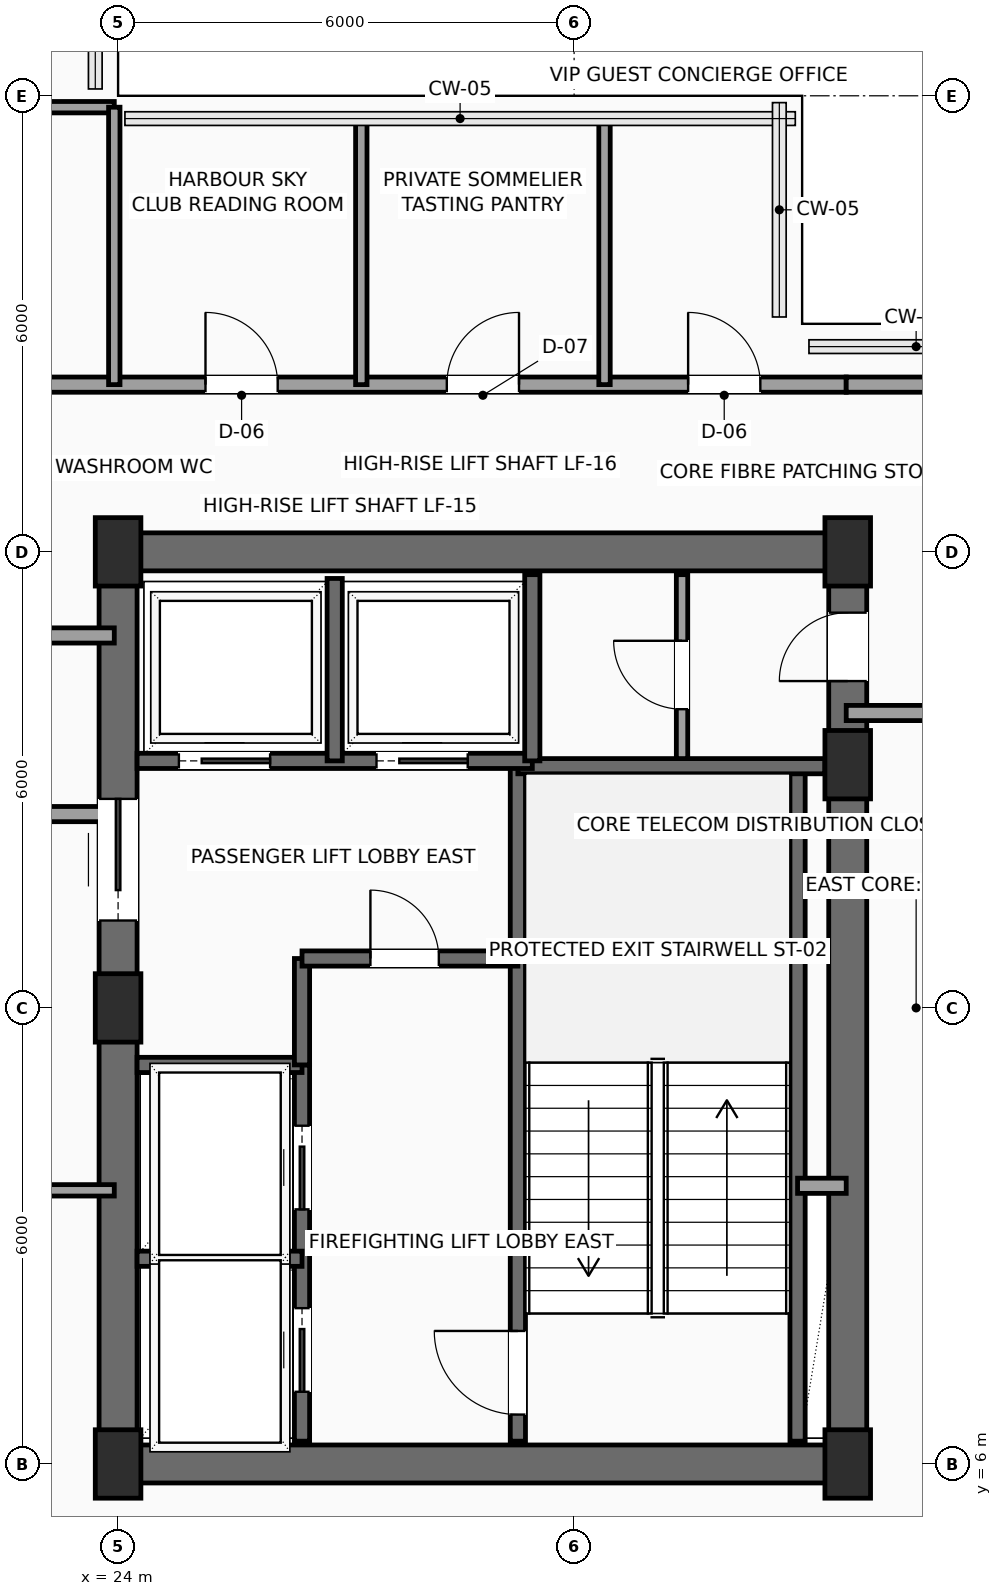
"""IFC4 building model, lengths in metres.
Left out: names, types, materials, properties, quantities, classifications, styles, units other than length and angle.
Written with IfcOpenShell. Run it as: python <this file> out.ifc"""

import sys

from ifc_helpers import new_model, si_unit, direction, frame, frame_2d, origin, origin_2d, place, context, subcontext, project, spatial, rectangle, extrude, element, fill, save


model = new_model("IFC4")
c1 = context("Model", 3, precision=1e-05, world=origin(), true_north=direction((0.0, 1.0)))
c2 = subcontext(c1, "Body", "Model", "MODEL_VIEW")
j1 = project(units=[si_unit("LENGTHUNIT", "METRE"), si_unit("PLANEANGLEUNIT", "RADIAN")], contexts=[c1])
p1 = place(None, origin())
s1 = spatial("IfcSite", under=j1, at=p1, CompositionType="ELEMENT")
p2 = place(p1, origin())
s2 = spatial("IfcBuilding", under=s1, at=p2, CompositionType="ELEMENT")
p3 = place(p2, frame((0.0, 0.0, 274.7)))
s3 = spatial("IfcBuildingStorey", under=s2, at=p3, CompositionType="ELEMENT", Elevation=274.7)
for number, where, z_axis, x_axis in (
    (1, (24.0, 6.0, 0.0), (0.0, 0.0, 1.0), (1.0, 0.0, 0.0)),
    (2, (24.0, 12.0, 0.0), (0.0, 0.0, 1.0), (1.0, 0.0, 0.0)),
    (3, (24.0, 18.0, 0.0), (0.0, 0.0, 1.0), (1.0, 0.0, 0.0)),
    (4, (33.6, 6.0, 0.0), (0.0, 0.0, 1.0), (1.0, 0.0, 0.0)),
    (5, (33.6, 15.2, 0.0), (0.0, 0.0, 1.0), (1.0, 0.0, 0.0)),
    (6, (33.6, 18.0, 0.0), (0.0, 0.0, 1.0), (1.0, 0.0, 0.0)),
):
    element("IfcColumn", number, at=place(p3, frame(where, z_axis=z_axis, x_axis=x_axis)), inside=s3, PredefinedType="COLUMN", context=c2, shape_type="SweptSolid", body=[
        extrude(rectangle(XDim=0.6, YDim=0.9, at=origin_2d()), origin(), (0.0, 0.0, 1.0), 3.5),
    ])
for number, where, z_axis, x_axis in (
    (7, (24.0, 6.0, 0.0), (0.0, 0.0, 1.0), (1.0, 0.0, 0.0)),
    (8, (24.0, 18.0, 0.0), (0.0, 0.0, 1.0), (1.0, 0.0, 0.0)),
):
    element("IfcWall", number, at=place(p3, frame(where, z_axis=z_axis, x_axis=x_axis)), inside=s3, PredefinedType="SHEAR", context=c2, shape_type="SweptSolid", body=[
        extrude(rectangle(XDim=9.6, YDim=0.5, at=frame_2d((4.8, 0.0))), origin(), (0.0, 0.0, 1.0), 3.3),
    ])
p4 = place(p3, frame((24.0, 6.0, 0.0), z_axis=(0.0, 0.0, 1.0), x_axis=(0.0, 1.0, 0.0)))
e9 = element("IfcWall", 9, at=p4, inside=s3, PredefinedType="SHEAR", context=c2, shape_type="SweptSolid", body=[
    extrude(rectangle(XDim=12.0, YDim=0.5, at=frame_2d((6.0, 0.0))), origin(), (0.0, 0.0, 1.0), 3.3),
])
p5 = place(p4, frame((7.15, 0.0, 0.0)))
e10 = element("IfcOpeningElement", 10, at=p5, cuts=e9, PredefinedType="OPENING", context=c2, shape_type="SweptSolid", body=[
    extrude(rectangle(XDim=1.6, YDim=2.3, at=frame_2d((0.8, 1.15))), frame((0.0, 0.26, 0.0), z_axis=(0.0, -1.0, 0.0), x_axis=(1.0, 0.0, 0.0)), (0.0, 0.0, 1.0), 0.52),
])
p6 = place(p3, frame((33.6, 6.0, 0.0), z_axis=(0.0, 0.0, 1.0), x_axis=(0.0, 1.0, 0.0)))
e11 = element("IfcWall", 11, at=p6, inside=s3, PredefinedType="SHEAR", context=c2, shape_type="SweptSolid", body=[
    extrude(rectangle(XDim=12.0, YDim=0.5, at=frame_2d((6.0, 0.0))), origin(), (0.0, 0.0, 1.0), 3.3),
])
p7 = place(p6, frame((10.3, 0.0, 0.0)))
e12 = element("IfcOpeningElement", 12, at=p7, cuts=e11, PredefinedType="OPENING", context=c2, shape_type="SweptSolid", body=[
    extrude(rectangle(XDim=0.9, YDim=2.15, at=frame_2d((0.45, 1.075))), frame((0.0, 0.26, 0.0), z_axis=(0.0, -1.0, 0.0), x_axis=(1.0, 0.0, 0.0)), (0.0, 0.0, 1.0), 0.52),
])
p8 = place(p3, frame((29.26, 6.3, 0.0), z_axis=(0.0, 0.0, 1.0), x_axis=(0.0, 1.0, 0.0)))
e13 = element("IfcWall", 13, at=p8, inside=s3, PredefinedType="SHEAR", context=c2, shape_type="SweptSolid", body=[
    extrude(rectangle(XDim=8.88, YDim=0.2, at=frame_2d((4.44, 0.0))), origin(), (0.0, 0.0, 1.0), 3.3),
])
p9 = place(p8, frame((0.35, 0.0, 0.0)))
e14 = element("IfcOpeningElement", 14, at=p9, cuts=e13, PredefinedType="OPENING", context=c2, shape_type="SweptSolid", body=[
    extrude(rectangle(XDim=1.1, YDim=2.2, at=frame_2d((0.55, 1.1))), frame((0.0, 0.11, 0.0), z_axis=(0.0, -1.0, 0.0), x_axis=(1.0, 0.0, 0.0)), (0.0, 0.0, 1.0), 0.22),
])
p10 = place(p3, frame((32.94, 6.3, 0.0), z_axis=(0.0, 0.0, 1.0), x_axis=(0.0, 1.0, 0.0)))
e15 = element("IfcWall", 15, at=p10, inside=s3, PredefinedType="SHEAR", context=c2, shape_type="SweptSolid", body=[
    extrude(rectangle(XDim=8.88, YDim=0.2, at=frame_2d((4.44, 0.0))), origin(), (0.0, 0.0, 1.0), 3.3),
])
p11 = place(p3, frame((29.26, 15.18, 0.0), z_axis=(0.0, 0.0, 1.0), x_axis=(1.0, 0.0, 0.0)))
e16 = element("IfcWall", 16, at=p11, inside=s3, PredefinedType="SHEAR", context=c2, shape_type="SweptSolid", body=[
    extrude(rectangle(XDim=4.04, YDim=0.2, at=frame_2d((2.02, 0.0))), origin(), (0.0, 0.0, 1.0), 3.3),
])
p12 = place(p3, frame((26.42, 6.3, 0.0), z_axis=(0.0, 0.0, 1.0), x_axis=(0.0, 1.0, 0.0)))
e17 = element("IfcWall", 17, at=p12, inside=s3, PredefinedType="SHEAR", context=c2, shape_type="SweptSolid", body=[
    extrude(rectangle(XDim=4.95, YDim=0.2, at=frame_2d((2.475, 0.0))), origin(), (0.0, 0.0, 1.0), 3.3),
])
p13 = place(p12, frame((0.65, 0.0, 0.0)))
e18 = element("IfcOpeningElement", 18, at=p13, cuts=e17, PredefinedType="OPENING", context=c2, shape_type="SweptSolid", body=[
    extrude(rectangle(XDim=1.1, YDim=2.2, at=frame_2d((0.55, 1.1))), frame((0.0, 0.11, 0.0), z_axis=(0.0, -1.0, 0.0), x_axis=(1.0, 0.0, 0.0)), (0.0, 0.0, 1.0), 0.22),
])
p14 = place(p12, frame((3.05, 0.0, 0.0)))
e19 = element("IfcOpeningElement", 19, at=p14, cuts=e17, PredefinedType="OPENING", context=c2, shape_type="SweptSolid", body=[
    extrude(rectangle(XDim=1.1, YDim=2.2, at=frame_2d((0.55, 1.1))), frame((0.0, 0.11, 0.0), z_axis=(0.0, -1.0, 0.0), x_axis=(1.0, 0.0, 0.0)), (0.0, 0.0, 1.0), 0.22),
])
for number, where, z_axis, x_axis in (
    (20, (24.25, 8.7, 0.0), (0.0, 0.0, 1.0), (1.0, 0.0, 0.0)),
    (21, (24.25, 11.25, 0.0), (0.0, 0.0, 1.0), (1.0, 0.0, 0.0)),
):
    element("IfcWall", number, at=place(p3, frame(where, z_axis=z_axis, x_axis=x_axis)), inside=s3, PredefinedType="SHEAR", context=c2, shape_type="SweptSolid", body=[
        extrude(rectangle(XDim=2.17, YDim=0.2, at=frame_2d((1.085, 0.0))), origin(), (0.0, 0.0, 1.0), 3.3),
    ])
p15 = place(p3, frame((26.42, 11.25, 0.0), z_axis=(0.0, 0.0, 1.0), x_axis=(0.0, 1.0, 0.0)))
e22 = element("IfcWall", 22, at=p15, inside=s3, PredefinedType="SHEAR", context=c2, shape_type="SweptSolid", body=[
    extrude(rectangle(XDim=1.4, YDim=0.2, at=frame_2d((0.7, 0.0))), origin(), (0.0, 0.0, 1.0), 3.3),
])
p16 = place(p3, frame((26.42, 12.65, 0.0), z_axis=(0.0, 0.0, 1.0), x_axis=(1.0, 0.0, 0.0)))
e23 = element("IfcWall", 23, at=p16, inside=s3, PredefinedType="SHEAR", context=c2, shape_type="SweptSolid", body=[
    extrude(rectangle(XDim=2.84, YDim=0.2, at=frame_2d((1.42, 0.0))), origin(), (0.0, 0.0, 1.0), 3.3),
])
p17 = place(p16, frame((0.9, 0.0, 0.0)))
e24 = element("IfcOpeningElement", 24, at=p17, cuts=e23, PredefinedType="OPENING", context=c2, shape_type="SweptSolid", body=[
    extrude(rectangle(XDim=0.9, YDim=2.15, at=frame_2d((0.45, 1.075))), frame((0.0, 0.11, 0.0), z_axis=(0.0, -1.0, 0.0), x_axis=(1.0, 0.0, 0.0)), (0.0, 0.0, 1.0), 0.22),
])
p18 = place(p3, frame((32.94, 9.66, 0.0), z_axis=(0.0, 0.0, 1.0), x_axis=(1.0, 0.0, 0.0)))
e25 = element("IfcWall", 25, at=p18, inside=s3, PredefinedType="SOLIDWALL", context=c2, shape_type="SweptSolid", body=[
    extrude(rectangle(XDim=0.64, YDim=0.2, at=frame_2d((0.32, 0.0))), origin(), (0.0, 0.0, 1.0), 3.3),
])
p19 = place(p3, frame((24.25, 15.25, 0.0), z_axis=(0.0, 0.0, 1.0), x_axis=(1.0, 0.0, 0.0)))
e26 = element("IfcWall", 26, at=p19, inside=s3, PredefinedType="SHEAR", context=c2, shape_type="SweptSolid", body=[
    extrude(rectangle(XDim=5.2, YDim=0.2, at=frame_2d((2.6, 0.0))), origin(), (0.0, 0.0, 1.0), 3.3),
])
p20 = place(p19, frame((0.55, 0.0, 0.0)))
e27 = element("IfcOpeningElement", 27, at=p20, cuts=e26, PredefinedType="OPENING", context=c2, shape_type="SweptSolid", body=[
    extrude(rectangle(XDim=1.2, YDim=2.2, at=frame_2d((0.6, 1.1))), frame((0.0, 0.11, 0.0), z_axis=(0.0, -1.0, 0.0), x_axis=(1.0, 0.0, 0.0)), (0.0, 0.0, 1.0), 0.22),
])
p21 = place(p19, frame((3.15, 0.0, 0.0)))
e28 = element("IfcOpeningElement", 28, at=p21, cuts=e26, PredefinedType="OPENING", context=c2, shape_type="SweptSolid", body=[
    extrude(rectangle(XDim=1.2, YDim=2.2, at=frame_2d((0.6, 1.1))), frame((0.0, 0.11, 0.0), z_axis=(0.0, -1.0, 0.0), x_axis=(1.0, 0.0, 0.0)), (0.0, 0.0, 1.0), 0.22),
])
p22 = place(p3, frame((26.85, 15.25, 0.0), z_axis=(0.0, 0.0, 1.0), x_axis=(0.0, 1.0, 0.0)))
e29 = element("IfcWall", 29, at=p22, inside=s3, PredefinedType="SHEAR", context=c2, shape_type="SweptSolid", body=[
    extrude(rectangle(XDim=2.4, YDim=0.2, at=frame_2d((1.2, 0.0))), origin(), (0.0, 0.0, 1.0), 3.3),
])
p23 = place(p3, frame((29.45, 15.25, 0.0), z_axis=(0.0, 0.0, 1.0), x_axis=(0.0, 1.0, 0.0)))
e30 = element("IfcWall", 30, at=p23, inside=s3, PredefinedType="SHEAR", context=c2, shape_type="SweptSolid", body=[
    extrude(rectangle(XDim=2.45, YDim=0.2, at=frame_2d((1.225, 0.0))), origin(), (0.0, 0.0, 1.0), 3.3),
])
p24 = place(p3, frame((31.42, 15.28, 0.0), z_axis=(0.0, 0.0, 1.0), x_axis=(0.0, 1.0, 0.0)))
e31 = element("IfcWall", 31, at=p24, inside=s3, PredefinedType="PARTITIONING", context=c2, shape_type="SweptSolid", body=[
    extrude(rectangle(XDim=2.42, YDim=0.15, at=frame_2d((1.21, 0.0))), origin(), (0.0, 0.0, 1.0), 3.3),
])
p25 = place(p24, frame((0.65, 0.0, 0.0)))
e32 = element("IfcOpeningElement", 32, at=p25, cuts=e31, PredefinedType="OPENING", context=c2, shape_type="SweptSolid", body=[
    extrude(rectangle(XDim=0.9, YDim=2.15, at=frame_2d((0.45, 1.075))), frame((0.0, 0.085, 0.0), z_axis=(0.0, -1.0, 0.0), x_axis=(1.0, 0.0, 0.0)), (0.0, 0.0, 1.0), 0.17),
])
p26 = place(p3, frame((20.45, 20.2, 0.0), z_axis=(0.0, 0.0, 1.0), x_axis=(1.0, 0.0, 0.0)))
e33 = element("IfcWall", 33, at=p26, inside=s3, PredefinedType="PARTITIONING", context=c2, shape_type="SweptSolid", body=[
    extrude(rectangle(XDim=13.13, YDim=0.2, at=frame_2d((6.565, 0.0))), origin(), (0.0, 0.0, 1.0), 3.3),
])
p27 = place(p26, frame((4.7, 0.0, 0.0)))
e34 = element("IfcOpeningElement", 34, at=p27, cuts=e33, PredefinedType="OPENING", context=c2, shape_type="SweptSolid", body=[
    extrude(rectangle(XDim=0.95, YDim=2.15, at=frame_2d((0.475, 1.075))), frame((0.0, 0.11, 0.0), z_axis=(0.0, -1.0, 0.0), x_axis=(1.0, 0.0, 0.0)), (0.0, 0.0, 1.0), 0.22),
])
p28 = place(p26, frame((7.875, 0.0, 0.0)))
e35 = element("IfcOpeningElement", 35, at=p28, cuts=e33, PredefinedType="OPENING", context=c2, shape_type="SweptSolid", body=[
    extrude(rectangle(XDim=0.95, YDim=2.15, at=frame_2d((0.475, 1.075))), frame((0.0, 0.11, 0.0), z_axis=(0.0, -1.0, 0.0), x_axis=(1.0, 0.0, 0.0)), (0.0, 0.0, 1.0), 0.22),
])
p29 = place(p26, frame((11.05, 0.0, 0.0)))
e36 = element("IfcOpeningElement", 36, at=p29, cuts=e33, PredefinedType="OPENING", context=c2, shape_type="SweptSolid", body=[
    extrude(rectangle(XDim=0.95, YDim=2.15, at=frame_2d((0.475, 1.075))), frame((0.0, 0.11, 0.0), z_axis=(0.0, -1.0, 0.0), x_axis=(1.0, 0.0, 0.0)), (0.0, 0.0, 1.0), 0.22),
])
for number, where, z_axis, x_axis in (
    (37, (33.58, 20.2, 0.0), (0.0, 0.0, 1.0), (1.0, 0.0, 0.0)),
    (38, (35.7, 15.88, 0.0), (0.0, 0.0, 1.0), (-1.0, 0.0, 0.0)),
):
    element("IfcWall", number, at=place(p3, frame(where, z_axis=z_axis, x_axis=x_axis)), inside=s3, PredefinedType="PARTITIONING", context=c2, shape_type="SweptSolid", body=[
        extrude(rectangle(XDim=2.12, YDim=0.2, at=frame_2d((1.06, 0.0))), origin(), (0.0, 0.0, 1.0), 3.3),
    ])
p30 = place(p3, frame((20.45, 16.9, 0.0), z_axis=(0.0, 0.0, 1.0), x_axis=(1.0, 0.0, 0.0)))
e39 = element("IfcWall", 39, at=p30, inside=s3, PredefinedType="PARTITIONING", context=c2, shape_type="SweptSolid", body=[
    extrude(rectangle(XDim=3.5, YDim=0.2, at=frame_2d((1.75, 0.0))), origin(), (0.0, 0.0, 1.0), 3.3),
])
p31 = place(p3, frame((23.95, 14.55, 0.0), z_axis=(0.0, 0.0, 1.0), x_axis=(-1.0, 0.0, 0.0)))
e40 = element("IfcWall", 40, at=p31, inside=s3, PredefinedType="PARTITIONING", context=c2, shape_type="SweptSolid", body=[
    extrude(rectangle(XDim=9.0, YDim=0.2, at=frame_2d((4.5, 0.0))), origin(), (0.0, 0.0, 1.0), 3.3),
])
p32 = place(p3, frame((20.45, 23.85, 0.0), z_axis=(0.0, 0.0, 1.0), x_axis=(1.0, 0.0, 0.0)))
e41 = element("IfcWall", 41, at=p32, inside=s3, PredefinedType="PARTITIONING", context=c2, shape_type="SweptSolid", body=[
    extrude(rectangle(XDim=3.5, YDim=0.15, at=frame_2d((1.75, 0.0))), origin(), (0.0, 0.0, 1.0), 3.3),
])
p33 = place(p3, frame((23.95, 20.2, 0.0), z_axis=(0.0, 0.0, 1.0), x_axis=(0.0, 1.0, 0.0)))
e42 = element("IfcWall", 42, at=p33, inside=s3, PredefinedType="PARTITIONING", context=c2, shape_type="SweptSolid", body=[
    extrude(rectangle(XDim=3.65, YDim=0.15, at=frame_2d((1.825, 0.0))), origin(), (0.0, 0.0, 1.0), 3.3),
])
for number, where, z_axis, x_axis in (
    (43, (27.2, 20.2, 0.0), (0.0, 0.0, 1.0), (0.0, 1.0, 0.0)),
    (44, (30.4, 20.2, 0.0), (0.0, 0.0, 1.0), (0.0, 1.0, 0.0)),
):
    element("IfcWall", number, at=place(p3, frame(where, z_axis=z_axis, x_axis=x_axis)), inside=s3, PredefinedType="PARTITIONING", context=c2, shape_type="SweptSolid", body=[
        extrude(rectangle(XDim=3.5, YDim=0.15, at=frame_2d((1.75, 0.0))), origin(), (0.0, 0.0, 1.0), 3.3),
    ])
p34 = place(p3, frame((14.95, 9.6, 0.0), z_axis=(0.0, 0.0, 1.0), x_axis=(1.0, 0.0, 0.0)))
e45 = element("IfcWall", 45, at=p34, inside=s3, PredefinedType="PARTITIONING", context=c2, shape_type="SweptSolid", body=[
    extrude(rectangle(XDim=9.0, YDim=0.15, at=frame_2d((4.5, 0.0))), origin(), (0.0, 0.0, 1.0), 3.3),
])
p35 = place(p5, origin())
e46 = element("IfcDoor", 46, at=p35, inside=s3, OperationType="DOUBLE_DOOR_SLIDING", PredefinedType="DOOR", context=c2, shape_type="SweptSolid", body=[
    extrude(rectangle(XDim=1.6, YDim=2.3, at=frame_2d((0.8, 1.15))), frame((0.0, 0.025, 0.0), z_axis=(0.0, -1.0, 0.0), x_axis=(1.0, 0.0, 0.0)), (0.0, 0.0, 1.0), 0.05),
])
fill(e10, e46)
p36 = place(p7, origin())
e47 = element("IfcDoor", 47, at=p36, inside=s3, OperationType="SINGLE_SWING_LEFT", PredefinedType="DOOR", context=c2, shape_type="SweptSolid", body=[
    extrude(rectangle(XDim=0.9, YDim=2.15, at=frame_2d((0.45, 1.075))), frame((0.0, 0.025, 0.0), z_axis=(0.0, -1.0, 0.0), x_axis=(1.0, 0.0, 0.0)), (0.0, 0.0, 1.0), 0.05),
])
fill(e12, e47)
p37 = place(p9, origin())
e48 = element("IfcDoor", 48, at=p37, inside=s3, OperationType="SINGLE_SWING_RIGHT", PredefinedType="DOOR", context=c2, shape_type="SweptSolid", body=[
    extrude(rectangle(XDim=1.1, YDim=2.2, at=frame_2d((0.55, 1.1))), frame((0.0, 0.025, 0.0), z_axis=(0.0, -1.0, 0.0), x_axis=(1.0, 0.0, 0.0)), (0.0, 0.0, 1.0), 0.05),
])
fill(e14, e48)
p38 = place(p13, origin())
e49 = element("IfcDoor", 49, at=p38, inside=s3, OperationType="SLIDING_TO_LEFT", PredefinedType="DOOR", context=c2, shape_type="SweptSolid", body=[
    extrude(rectangle(XDim=1.1, YDim=2.2, at=frame_2d((0.55, 1.1))), frame((0.0, 0.025, 0.0), z_axis=(0.0, -1.0, 0.0), x_axis=(1.0, 0.0, 0.0)), (0.0, 0.0, 1.0), 0.05),
])
fill(e18, e49)
p39 = place(p14, origin())
e50 = element("IfcDoor", 50, at=p39, inside=s3, OperationType="SLIDING_TO_LEFT", PredefinedType="DOOR", context=c2, shape_type="SweptSolid", body=[
    extrude(rectangle(XDim=1.1, YDim=2.2, at=frame_2d((0.55, 1.1))), frame((0.0, 0.025, 0.0), z_axis=(0.0, -1.0, 0.0), x_axis=(1.0, 0.0, 0.0)), (0.0, 0.0, 1.0), 0.05),
])
fill(e19, e50)
p40 = place(p17, origin())
e51 = element("IfcDoor", 51, at=p40, inside=s3, OperationType="SINGLE_SWING_LEFT", PredefinedType="DOOR", context=c2, shape_type="SweptSolid", body=[
    extrude(rectangle(XDim=0.9, YDim=2.15, at=frame_2d((0.45, 1.075))), frame((0.0, 0.025, 0.0), z_axis=(0.0, -1.0, 0.0), x_axis=(1.0, 0.0, 0.0)), (0.0, 0.0, 1.0), 0.05),
])
fill(e24, e51)
p41 = place(p20, origin())
e52 = element("IfcDoor", 52, at=p41, inside=s3, OperationType="SLIDING_TO_RIGHT", PredefinedType="DOOR", context=c2, shape_type="SweptSolid", body=[
    extrude(rectangle(XDim=1.2, YDim=2.2, at=frame_2d((0.6, 1.1))), frame((0.0, 0.025, 0.0), z_axis=(0.0, -1.0, 0.0), x_axis=(1.0, 0.0, 0.0)), (0.0, 0.0, 1.0), 0.05),
])
fill(e27, e52)
p42 = place(p21, origin())
e53 = element("IfcDoor", 53, at=p42, inside=s3, OperationType="SLIDING_TO_RIGHT", PredefinedType="DOOR", context=c2, shape_type="SweptSolid", body=[
    extrude(rectangle(XDim=1.2, YDim=2.2, at=frame_2d((0.6, 1.1))), frame((0.0, 0.025, 0.0), z_axis=(0.0, -1.0, 0.0), x_axis=(1.0, 0.0, 0.0)), (0.0, 0.0, 1.0), 0.05),
])
fill(e28, e53)
p43 = place(p25, origin())
e54 = element("IfcDoor", 54, at=p43, inside=s3, OperationType="SINGLE_SWING_RIGHT", PredefinedType="DOOR", context=c2, shape_type="SweptSolid", body=[
    extrude(rectangle(XDim=0.9, YDim=2.15, at=frame_2d((0.45, 1.075))), frame((0.0, 0.025, 0.0), z_axis=(0.0, -1.0, 0.0), x_axis=(1.0, 0.0, 0.0)), (0.0, 0.0, 1.0), 0.05),
])
fill(e32, e54)
p44 = place(p27, origin())
e55 = element("IfcDoor", 55, at=p44, inside=s3, OperationType="SINGLE_SWING_LEFT", PredefinedType="DOOR", context=c2, shape_type="SweptSolid", body=[
    extrude(rectangle(XDim=0.95, YDim=2.15, at=frame_2d((0.475, 1.075))), frame((0.0, 0.025, 0.0), z_axis=(0.0, -1.0, 0.0), x_axis=(1.0, 0.0, 0.0)), (0.0, 0.0, 1.0), 0.05),
])
fill(e34, e55)
p45 = place(p28, origin())
e56 = element("IfcDoor", 56, at=p45, inside=s3, OperationType="SINGLE_SWING_RIGHT", PredefinedType="DOOR", context=c2, shape_type="SweptSolid", body=[
    extrude(rectangle(XDim=0.95, YDim=2.15, at=frame_2d((0.475, 1.075))), frame((0.0, 0.025, 0.0), z_axis=(0.0, -1.0, 0.0), x_axis=(1.0, 0.0, 0.0)), (0.0, 0.0, 1.0), 0.05),
])
fill(e35, e56)
p46 = place(p29, origin())
e57 = element("IfcDoor", 57, at=p46, inside=s3, OperationType="SINGLE_SWING_LEFT", PredefinedType="DOOR", context=c2, shape_type="SweptSolid", body=[
    extrude(rectangle(XDim=0.95, YDim=2.15, at=frame_2d((0.475, 1.075))), frame((0.0, 0.025, 0.0), z_axis=(0.0, -1.0, 0.0), x_axis=(1.0, 0.0, 0.0)), (0.0, 0.0, 1.0), 0.05),
])
fill(e36, e57)
save(model, sys.argv[1])
